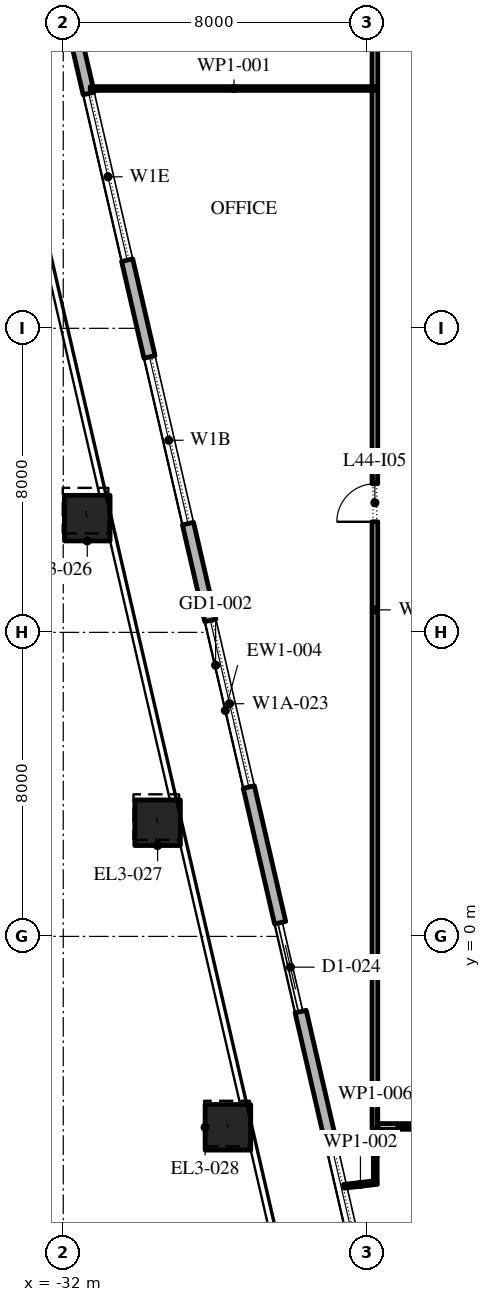
"""IFC4 building model, lengths in metres.
Left out: names, types, materials, properties, quantities, classifications, styles, units other than length and angle.
Written with IfcOpenShell. Run it as: python <this file> out.ifc"""

import sys

from ifc_helpers import new_model, si_unit, direction, frame, frame_2d, origin, origin_2d, place, context, subcontext, project, spatial, rectangle, extrude, element, fill, save


model = new_model("IFC4")
c1 = context("Model", 3, precision=1e-05, world=origin(), true_north=direction((0.0, 1.0)))
c2 = subcontext(c1, "Body", "Model", "MODEL_VIEW")
j1 = project(units=[si_unit("LENGTHUNIT", "METRE"), si_unit("PLANEANGLEUNIT", "RADIAN")], contexts=[c1])
p1 = place(None, origin())
s1 = spatial("IfcSite", under=j1, at=p1, CompositionType="ELEMENT")
p2 = place(p1, origin())
s2 = spatial("IfcBuilding", under=s1, at=p2, CompositionType="ELEMENT")
p3 = place(p2, frame((0.0, 0.0, 201.0)))
s3 = spatial("IfcBuildingStorey", under=s2, at=p3, CompositionType="ELEMENT", Elevation=201.0)
p4 = place(p3, frame((-31.368, 11.005, 0.0), z_axis=(-0.010799619665, 0.046740289408, 0.998848694028), x_axis=(-0.974329962248, -0.225124686929, 0.0)))
e1 = element("IfcColumn", 1, at=p4, inside=s3, PredefinedType="COLUMN", context=c2, shape_type="SweptSolid", body=[
    extrude(rectangle(XDim=1.2, YDim=1.2, at=origin_2d()), origin(), (0.0, 0.0, 1.0), 4.205),
])
p5 = place(p3, frame((-29.518, 2.991, 0.0), z_axis=(-0.0080747472, 0.035087390713, 0.999351626541), x_axis=(-0.974526982896, -0.224270282488, 0.0)))
e2 = element("IfcColumn", 2, at=p5, inside=s3, PredefinedType="COLUMN", context=c2, shape_type="SweptSolid", body=[
    extrude(rectangle(XDim=1.2, YDim=1.2, at=origin_2d()), origin(), (0.0, 0.0, 1.0), 4.203),
])
p6 = place(p3, frame((-27.667, -5.023, 0.0), z_axis=(-0.005404479485, 0.023361298418, 0.999712479335), x_axis=(-0.974268511785, -0.225390476607, 0.0)))
e3 = element("IfcColumn", 3, at=p6, inside=s3, PredefinedType="COLUMN", context=c2, shape_type="SweptSolid", body=[
    extrude(rectangle(XDim=1.2, YDim=1.2, at=origin_2d()), origin(), (0.0, 0.0, 1.0), 4.201),
])
p7 = place(p3, frame((-33.157, 30.092, 0.0), z_axis=(0.0, 0.0, 1.0), x_axis=(0.224950279389, -0.974370243697, 0.0)))
e4 = element("IfcWall", 4, at=p7, inside=s3, PredefinedType="STANDARD", context=c2, shape_type="SweptSolid", body=[
    extrude(rectangle(XDim=49.5, YDim=0.3, at=frame_2d((24.75, 0.0))), origin(), (0.0, 0.0, 1.0), 4.0),
])
p8 = place(p7, frame((2.207, 0.0, 0.0)))
e5 = element("IfcOpeningElement", 5, at=p8, cuts=e4, PredefinedType="OPENING", context=c2, shape_type="SweptSolid", body=[
    extrude(rectangle(XDim=2.4, YDim=3.5, at=frame_2d((1.2, 1.75))), frame((0.0, 0.16, 0.0), z_axis=(0.0, -1.0, 0.0), x_axis=(1.0, 0.0, 0.0)), (0.0, 0.0, 1.0), 0.32),
])
p9 = place(p7, frame((8.121, 0.0, 0.45)))
e6 = element("IfcOpeningElement", 6, at=p9, cuts=e4, PredefinedType="OPENING", context=c2, shape_type="SweptSolid", body=[
    extrude(rectangle(XDim=4.5, YDim=2.825, at=frame_2d((2.25, 1.413))), frame((0.0, 0.16, 0.0), z_axis=(0.0, -1.0, 0.0), x_axis=(1.0, 0.0, 0.0)), (0.0, 0.0, 1.0), 0.32),
])
p10 = place(p7, frame((15.236, 0.0, 0.45)))
e7 = element("IfcOpeningElement", 7, at=p10, cuts=e4, PredefinedType="OPENING", context=c2, shape_type="SweptSolid", body=[
    extrude(rectangle(XDim=4.5, YDim=2.95, at=frame_2d((2.25, 1.475))), frame((0.0, 0.16, 0.0), z_axis=(0.0, -1.0, 0.0), x_axis=(1.0, 0.0, 0.0)), (0.0, 0.0, 1.0), 0.32),
])
p11 = place(p7, frame((22.35, 0.0, 0.45)))
e8 = element("IfcOpeningElement", 8, at=p11, cuts=e4, PredefinedType="OPENING", context=c2, shape_type="SweptSolid", body=[
    extrude(rectangle(XDim=4.5, YDim=3.0, at=frame_2d((2.25, 1.5))), frame((0.0, 0.16, 0.0), z_axis=(0.0, -1.0, 0.0), x_axis=(1.0, 0.0, 0.0)), (0.0, 0.0, 1.0), 0.32),
])
p12 = place(p7, frame((30.514, 0.0, 0.0)))
e9 = element("IfcOpeningElement", 9, at=p12, cuts=e4, PredefinedType="OPENING", context=c2, shape_type="SweptSolid", body=[
    extrude(rectangle(XDim=2.4, YDim=3.5, at=frame_2d((1.2, 1.75))), frame((0.0, 0.16, 0.0), z_axis=(0.0, -1.0, 0.0), x_axis=(1.0, 0.0, 0.0)), (0.0, 0.0, 1.0), 0.32),
])
p13 = place(p7, frame((36.579, 0.0, 0.45)))
e10 = element("IfcOpeningElement", 10, at=p13, cuts=e4, PredefinedType="OPENING", context=c2, shape_type="SweptSolid", body=[
    extrude(rectangle(XDim=4.5, YDim=3.05, at=frame_2d((2.25, 1.525))), frame((0.0, 0.16, 0.0), z_axis=(0.0, -1.0, 0.0), x_axis=(1.0, 0.0, 0.0)), (0.0, 0.0, 1.0), 0.32),
])
p14 = place(p7, frame((43.693, 0.0, 0.45)))
e11 = element("IfcOpeningElement", 11, at=p14, cuts=e4, PredefinedType="OPENING", context=c2, shape_type="SweptSolid", body=[
    extrude(rectangle(XDim=4.5, YDim=3.05, at=frame_2d((2.25, 1.525))), frame((0.0, 0.16, 0.0), z_axis=(0.0, -1.0, 0.0), x_axis=(1.0, 0.0, 0.0)), (0.0, 0.0, 1.0), 0.32),
])
p15 = place(p3, frame((-31.289, 22.31, 0.0), z_axis=(0.0, 0.0, 1.0), x_axis=(1.0, 0.0, 0.0)))
e12 = element("IfcWall", 12, at=p15, inside=s3, PredefinedType="PARTITIONING", context=c2, shape_type="SweptSolid", body=[
    extrude(rectangle(XDim=7.564, YDim=0.1, at=frame_2d((3.782, 0.0))), origin(), (0.0, 0.0, 1.0), 4.0),
])
p16 = place(p3, frame((-24.62, -6.575, 0.0), z_axis=(0.0, 0.0, 1.0), x_axis=(0.993501545499, 0.113818623659, 0.0)))
e13 = element("IfcWall", 13, at=p16, inside=s3, PredefinedType="PARTITIONING", context=c2, shape_type="SweptSolid", body=[
    extrude(rectangle(XDim=0.886, YDim=0.1, at=frame_2d((0.443, 0.0))), origin(), (0.0, 0.0, 1.0), 4.0),
])
p17 = place(p3, frame((-23.8, -5.075, 0.0), z_axis=(0.0, 0.0, 1.0), x_axis=(0.0, 1.0, 0.0)))
e14 = element("IfcWall", 14, at=p17, inside=s3, PredefinedType="PARTITIONING", context=c2, shape_type="SweptSolid", body=[
    extrude(rectangle(XDim=27.335, YDim=0.15, at=frame_2d((13.667, 0.0))), origin(), (0.0, 0.0, 1.0), 4.0),
])
p18 = place(p17, frame((15.985, 0.0, 0.0)))
e15 = element("IfcOpeningElement", 15, at=p18, cuts=e14, PredefinedType="OPENING", context=c2, shape_type="SweptSolid", body=[
    extrude(rectangle(XDim=1.0, YDim=2.1, at=frame_2d((0.5, 1.05))), frame((0.0, 0.085, 0.0), z_axis=(0.0, -1.0, 0.0), x_axis=(1.0, 0.0, 0.0)), (0.0, 0.0, 1.0), 0.17),
])
p19 = place(p3, frame((-23.8, 22.36, 0.0), z_axis=(0.0, 0.0, 1.0), x_axis=(0.0, 1.0, 0.0)))
e16 = element("IfcWall", 16, at=p19, inside=s3, PredefinedType="PARTITIONING", context=c2, shape_type="SweptSolid", body=[
    extrude(rectangle(XDim=4.915, YDim=0.15, at=frame_2d((2.458, 0.0))), origin(), (0.0, 0.0, 1.0), 4.0),
])
p20 = place(p19, frame((2.94, 0.0, 0.0)))
e17 = element("IfcOpeningElement", 17, at=p20, cuts=e16, PredefinedType="OPENING", context=c2, shape_type="SweptSolid", body=[
    extrude(rectangle(XDim=1.0, YDim=2.1, at=frame_2d((0.5, 1.05))), frame((0.0, 0.085, 0.0), z_axis=(0.0, -1.0, 0.0), x_axis=(1.0, 0.0, 0.0)), (0.0, 0.0, 1.0), 0.17),
])
p21 = place(p3, frame((-23.79, -5.075, 0.0), z_axis=(0.0, 0.0, 1.0), x_axis=(0.0, -1.0, 0.0)))
e18 = element("IfcWall", 18, at=p21, inside=s3, PredefinedType="PARTITIONING", context=c2, shape_type="SweptSolid", body=[
    extrude(rectangle(XDim=1.355, YDim=0.1, at=frame_2d((0.677, 0.0))), origin(), (0.0, 0.0, 1.0), 4.0),
])
p22 = place(p3, frame((-22.57, -5.0, 0.0), z_axis=(0.0, 0.0, 1.0), x_axis=(-1.0, 0.0, 0.0)))
e19 = element("IfcWall", 19, at=p22, inside=s3, PredefinedType="PARTITIONING", context=c2, shape_type="SweptSolid", body=[
    extrude(rectangle(XDim=1.145, YDim=0.15, at=frame_2d((0.573, 0.0))), origin(), (0.0, 0.0, 1.0), 4.0),
])
p23 = place(p9, origin())
e20 = element("IfcWindow", 20, at=p23, inside=s3, PartitioningType="DOUBLE_PANEL_VERTICAL", PredefinedType="WINDOW", context=c2, shape_type="SweptSolid", body=[
    extrude(rectangle(XDim=4.5, YDim=2.825, at=frame_2d((2.25, 1.413))), frame((0.0, 0.03, 0.0), z_axis=(0.0, -1.0, 0.0), x_axis=(1.0, 0.0, 0.0)), (0.0, 0.0, 1.0), 0.06),
])
fill(e6, e20)
p24 = place(p10, origin())
e21 = element("IfcWindow", 21, at=p24, inside=s3, PartitioningType="DOUBLE_PANEL_VERTICAL", PredefinedType="WINDOW", context=c2, shape_type="SweptSolid", body=[
    extrude(rectangle(XDim=4.5, YDim=2.95, at=frame_2d((2.25, 1.475))), frame((0.0, 0.03, 0.0), z_axis=(0.0, -1.0, 0.0), x_axis=(1.0, 0.0, 0.0)), (0.0, 0.0, 1.0), 0.06),
])
fill(e7, e21)
p25 = place(p11, origin())
e22 = element("IfcWindow", 22, at=p25, inside=s3, PartitioningType="DOUBLE_PANEL_VERTICAL", PredefinedType="WINDOW", context=c2, shape_type="SweptSolid", body=[
    extrude(rectangle(XDim=4.5, YDim=3.0, at=frame_2d((2.25, 1.5))), frame((0.0, 0.03, 0.0), z_axis=(0.0, -1.0, 0.0), x_axis=(1.0, 0.0, 0.0)), (0.0, 0.0, 1.0), 0.06),
])
fill(e8, e22)
p26 = place(p12, origin())
e23 = element("IfcDoor", 23, at=p26, inside=s3, OperationType="DOUBLE_DOOR_SLIDING", PredefinedType="DOOR", context=c2, shape_type="SweptSolid", body=[
    extrude(rectangle(XDim=2.4, YDim=3.5, at=frame_2d((1.2, 1.75))), frame((0.0, 0.025, 0.0), z_axis=(0.0, -1.0, 0.0), x_axis=(1.0, 0.0, 0.0)), (0.0, 0.0, 1.0), 0.05),
])
fill(e9, e23)
p27 = place(p13, origin())
e24 = element("IfcWindow", 24, at=p27, inside=s3, PartitioningType="DOUBLE_PANEL_VERTICAL", PredefinedType="WINDOW", context=c2, shape_type="SweptSolid", body=[
    extrude(rectangle(XDim=4.5, YDim=3.05, at=frame_2d((2.25, 1.525))), frame((0.0, 0.03, 0.0), z_axis=(0.0, -1.0, 0.0), x_axis=(1.0, 0.0, 0.0)), (0.0, 0.0, 1.0), 0.06),
])
fill(e10, e24)
p28 = place(p18, origin())
e25 = element("IfcDoor", 25, at=p28, inside=s3, OperationType="SINGLE_SWING_RIGHT", PredefinedType="DOOR", context=c2, shape_type="SweptSolid", body=[
    extrude(rectangle(XDim=1.0, YDim=2.1, at=frame_2d((0.5, 1.05))), frame((0.0, 0.025, 0.0), z_axis=(0.0, -1.0, 0.0), x_axis=(1.0, 0.0, 0.0)), (0.0, 0.0, 1.0), 0.05),
])
fill(e15, e25)
save(model, sys.argv[1])
